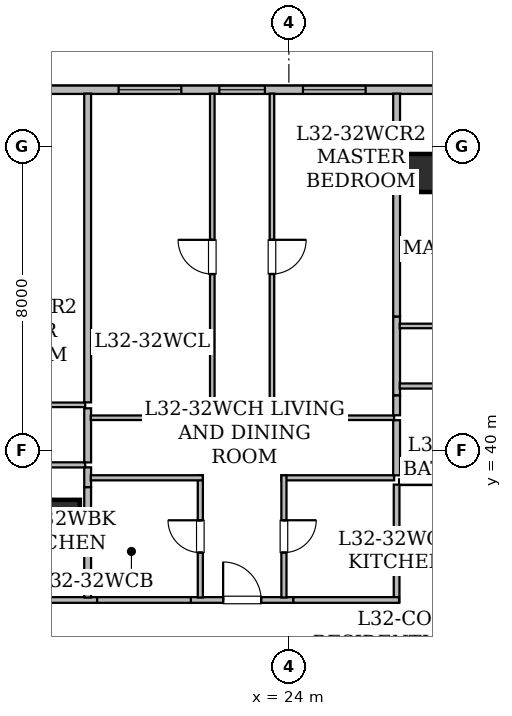
"""IFC4 building model, lengths in metres.
Left out: names, types, materials, properties, quantities, classifications, styles, units other than length and angle.
Written with IfcOpenShell. Run it as: python <this file> out.ifc"""

import sys

from ifc_helpers import new_model, si_unit, direction, frame, frame_2d, origin, origin_2d, place, context, subcontext, project, spatial, rectangle, hollow_rectangle, extrude, element, fill, save


model = new_model("IFC4")
c1 = context("Model", 3, precision=1e-05, world=origin(), true_north=direction((0.0, 1.0)))
c2 = subcontext(c1, "Body", "Model", "MODEL_VIEW")
j1 = project(units=[si_unit("LENGTHUNIT", "METRE"), si_unit("PLANEANGLEUNIT", "RADIAN")], contexts=[c1])
p1 = place(None, origin())
s1 = spatial("IfcSite", under=j1, at=p1, CompositionType="ELEMENT")
p2 = place(p1, origin())
s2 = spatial("IfcBuilding", under=s1, at=p2, CompositionType="ELEMENT")
p3 = place(p2, frame((0.0, 0.0, 127.45)))
s3 = spatial("IfcBuildingStorey", under=s2, at=p3, CompositionType="ELEMENT", Elevation=127.45)
for number, where, z_axis, x_axis in (
    (1, (27.35, 47.3, 0.0), (0.0, 0.0, 1.0), (1.0, 0.0, 0.0)),
    (2, (18.0, 38.2, 0.0), (0.0, 0.0, 1.0), (1.0, 0.0, 0.0)),
):
    element("IfcColumn", number, at=place(p3, frame(where, z_axis=z_axis, x_axis=x_axis)), inside=s3, PredefinedType="COLUMN", context=c2, shape_type="SweptSolid", body=[
        extrude(hollow_rectangle(XDim=1.0, YDim=1.0, WallThickness=0.05, at=origin_2d()), origin(), (0.0, 0.0, 1.0), 3.65),
    ])
p4 = place(p3, frame((13.715, 49.49, 0.0), z_axis=(0.0, 0.0, 1.0), x_axis=(1.0, 0.0, 0.0)))
e3 = element("IfcWall", 3, at=p4, inside=s3, PredefinedType="STANDARD", context=c2, shape_type="SweptSolid", body=[
    extrude(rectangle(XDim=38.639, YDim=0.22, at=frame_2d((19.319, 0.0))), origin(), (0.0, 0.0, 1.0), 3.43),
])
p5 = place(p4, frame((2.243, 0.0, 0.85)))
e4 = element("IfcOpeningElement", 4, at=p5, cuts=e3, PredefinedType="OPENING", context=c2, shape_type="SweptSolid", body=[
    extrude(rectangle(XDim=1.65, YDim=1.55, at=frame_2d((0.825, 0.775))), frame((0.0, 0.12, 0.0), z_axis=(0.0, -1.0, 0.0), x_axis=(1.0, 0.0, 0.0)), (0.0, 0.0, 1.0), 0.24),
])
p6 = place(p4, frame((8.455, 0.0, 0.8)))
e5 = element("IfcOpeningElement", 5, at=p6, cuts=e3, PredefinedType="OPENING", context=c2, shape_type="SweptSolid", body=[
    extrude(rectangle(XDim=1.2, YDim=1.5, at=frame_2d((0.6, 0.75))), frame((0.0, 0.12, 0.0), z_axis=(0.0, -1.0, 0.0), x_axis=(1.0, 0.0, 0.0)), (0.0, 0.0, 1.0), 0.24),
])
p7 = place(p4, frame((5.805, 0.0, 0.85)))
e6 = element("IfcOpeningElement", 6, at=p7, cuts=e3, PredefinedType="OPENING", context=c2, shape_type="SweptSolid", body=[
    extrude(rectangle(XDim=1.65, YDim=1.55, at=frame_2d((0.825, 0.775))), frame((0.0, 0.12, 0.0), z_axis=(0.0, -1.0, 0.0), x_axis=(1.0, 0.0, 0.0)), (0.0, 0.0, 1.0), 0.24),
])
p8 = place(p4, frame((10.655, 0.0, 0.85)))
e7 = element("IfcOpeningElement", 7, at=p8, cuts=e3, PredefinedType="OPENING", context=c2, shape_type="SweptSolid", body=[
    extrude(rectangle(XDim=1.65, YDim=1.55, at=frame_2d((0.825, 0.775))), frame((0.0, 0.12, 0.0), z_axis=(0.0, -1.0, 0.0), x_axis=(1.0, 0.0, 0.0)), (0.0, 0.0, 1.0), 0.24),
])
p9 = place(p4, frame((15.556, 0.0, 0.85)))
e8 = element("IfcOpeningElement", 8, at=p9, cuts=e3, PredefinedType="OPENING", context=c2, shape_type="SweptSolid", body=[
    extrude(rectangle(XDim=1.65, YDim=1.55, at=frame_2d((0.825, 0.775))), frame((0.0, 0.12, 0.0), z_axis=(0.0, -1.0, 0.0), x_axis=(1.0, 0.0, 0.0)), (0.0, 0.0, 1.0), 0.24),
])
p10 = place(p4, frame((22.821, 0.0, 0.85)))
e9 = element("IfcOpeningElement", 9, at=p10, cuts=e3, PredefinedType="OPENING", context=c2, shape_type="SweptSolid", body=[
    extrude(rectangle(XDim=1.65, YDim=1.55, at=frame_2d((0.825, 0.775))), frame((0.0, 0.12, 0.0), z_axis=(0.0, -1.0, 0.0), x_axis=(1.0, 0.0, 0.0)), (0.0, 0.0, 1.0), 0.24),
])
p11 = place(p4, frame((32.239, 0.0, 0.85)))
e10 = element("IfcOpeningElement", 10, at=p11, cuts=e3, PredefinedType="OPENING", context=c2, shape_type="SweptSolid", body=[
    extrude(rectangle(XDim=1.65, YDim=1.55, at=frame_2d((0.825, 0.775))), frame((0.0, 0.12, 0.0), z_axis=(0.0, -1.0, 0.0), x_axis=(1.0, 0.0, 0.0)), (0.0, 0.0, 1.0), 0.24),
])
p12 = place(p4, frame((28.676, 0.0, 0.85)))
e11 = element("IfcOpeningElement", 11, at=p12, cuts=e3, PredefinedType="OPENING", context=c2, shape_type="SweptSolid", body=[
    extrude(rectangle(XDim=1.65, YDim=1.55, at=frame_2d((0.825, 0.775))), frame((0.0, 0.12, 0.0), z_axis=(0.0, -1.0, 0.0), x_axis=(1.0, 0.0, 0.0)), (0.0, 0.0, 1.0), 0.24),
])
p13 = place(p4, frame((35.489, 0.0, 0.85)))
e12 = element("IfcOpeningElement", 12, at=p13, cuts=e3, PredefinedType="OPENING", context=c2, shape_type="SweptSolid", body=[
    extrude(rectangle(XDim=1.65, YDim=1.55, at=frame_2d((0.825, 0.775))), frame((0.0, 0.12, 0.0), z_axis=(0.0, -1.0, 0.0), x_axis=(1.0, 0.0, 0.0)), (0.0, 0.0, 1.0), 0.24),
])
p14 = place(p3, frame((15.424, 36.065, 0.0), z_axis=(0.0, 0.0, 1.0), x_axis=(1.0, 0.0, 0.0)))
e13 = element("IfcWall", 13, at=p14, inside=s3, PredefinedType="STANDARD", context=c2, shape_type="SweptSolid", body=[
    extrude(rectangle(XDim=3.53, YDim=0.15, at=frame_2d((1.765, 0.0))), origin(), (0.0, 0.0, 1.0), 2.647),
])
p15 = place(p3, frame((21.421, 36.065, 0.0), z_axis=(0.0, 0.0, 1.0), x_axis=(1.0, 0.0, 0.0)))
e14 = element("IfcWall", 14, at=p15, inside=s3, PredefinedType="STANDARD", context=c2, shape_type="SweptSolid", body=[
    extrude(rectangle(XDim=2.698, YDim=0.15, at=frame_2d((1.349, 0.0))), origin(), (0.0, 0.0, 1.0), 3.43),
])
p16 = place(p15, frame((0.849, 0.0, 0.0)))
e15 = element("IfcOpeningElement", 15, at=p16, cuts=e14, PredefinedType="OPENING", context=c2, shape_type="SweptSolid", body=[
    extrude(rectangle(XDim=1.0, YDim=2.15, at=frame_2d((0.5, 1.075))), frame((0.0, 0.085, 0.0), z_axis=(0.0, -1.0, 0.0), x_axis=(1.0, 0.0, 0.0)), (0.0, 0.0, 1.0), 0.17),
])
p17 = place(p3, frame((18.954, 36.065, 0.0), z_axis=(0.0, 0.0, 1.0), x_axis=(1.0, 0.0, 0.0)))
e16 = element("IfcWall", 16, at=p17, inside=s3, PredefinedType="STANDARD", context=c2, shape_type="SweptSolid", body=[
    extrude(rectangle(XDim=2.467, YDim=0.15, at=frame_2d((1.233, 0.0))), origin(), (0.0, 0.0, 1.0), 3.43),
])
p18 = place(p3, frame((26.835, 36.0, 0.0), z_axis=(0.0, 0.0, 1.0), x_axis=(0.0, 1.0, 0.0)))
e17 = element("IfcWall", 17, at=p18, inside=s3, PredefinedType="STANDARD", context=c2, shape_type="SweptSolid", body=[
    extrude(rectangle(XDim=3.1, YDim=0.15, at=frame_2d((1.55, 0.0))), origin(), (0.0, 0.0, 1.0), 2.647),
])
p19 = place(p3, frame((24.119, 36.065, 0.0), z_axis=(0.0, 0.0, 1.0), x_axis=(1.0, 0.0, 0.0)))
e18 = element("IfcWall", 18, at=p19, inside=s3, PredefinedType="STANDARD", context=c2, shape_type="SweptSolid", body=[
    extrude(rectangle(XDim=2.779, YDim=0.15, at=frame_2d((1.39, 0.0))), origin(), (0.0, 0.0, 1.0), 3.43),
])
p20 = place(p3, frame((26.9, 39.165, 0.0), z_axis=(0.0, 0.0, 1.0), x_axis=(1.0, 0.0, 0.0)))
e19 = element("IfcWall", 19, at=p20, inside=s3, PredefinedType="STANDARD", context=c2, shape_type="SweptSolid", body=[
    extrude(rectangle(XDim=4.701, YDim=0.15, at=frame_2d((2.351, 0.0))), origin(), (0.0, 0.0, 1.0), 2.647),
])
p21 = place(p3, frame((18.64, 39.62, 0.0), z_axis=(0.0, 0.0, 1.0), x_axis=(-1.0, 0.0, 0.0)))
e20 = element("IfcWall", 20, at=p21, inside=s3, PredefinedType="PARTITIONING", context=c2, shape_type="SweptSolid", body=[
    extrude(rectangle(XDim=3.53, YDim=0.135, at=frame_2d((1.765, 0.0))), origin(), (0.0, 0.0, 1.0), 2.647),
])
p22 = place(p3, frame((14.795, 41.2, 0.0), z_axis=(0.0, 0.0, 1.0), x_axis=(1.0, 0.0, 0.0)))
e21 = element("IfcWall", 21, at=p22, inside=s3, PredefinedType="PARTITIONING", context=c2, shape_type="SweptSolid", body=[
    extrude(rectangle(XDim=3.845, YDim=0.12, at=frame_2d((1.922, 0.0))), origin(), (0.0, 0.0, 1.0), 2.647),
])
p23 = place(p3, frame((18.705, 41.109, 0.0), z_axis=(0.0, 0.0, 1.0), x_axis=(0.0, -1.0, 0.0)))
e22 = element("IfcWall", 22, at=p23, inside=s3, PredefinedType="STANDARD", context=c2, shape_type="SweptSolid", body=[
    extrude(rectangle(XDim=1.424, YDim=0.18, at=frame_2d((0.712, 0.0))), origin(), (0.0, 0.0, 1.0), 3.43),
])
p24 = place(p3, frame((18.705, 39.555, 0.0), z_axis=(0.0, 0.0, 1.0), x_axis=(0.0, -1.0, 0.0)))
e23 = element("IfcWall", 23, at=p24, inside=s3, PredefinedType="STANDARD", context=c2, shape_type="SweptSolid", body=[
    extrude(rectangle(XDim=0.524, YDim=0.18, at=frame_2d((0.262, 0.0))), origin(), (0.0, 0.0, 1.0), 3.43),
])
p25 = place(p3, frame((18.705, 39.031, 0.0), z_axis=(0.0, 0.0, 1.0), x_axis=(0.0, -1.0, 0.0)))
e24 = element("IfcWall", 24, at=p25, inside=s3, PredefinedType="STANDARD", context=c2, shape_type="SweptSolid", body=[
    extrude(rectangle(XDim=2.901, YDim=0.18, at=frame_2d((1.451, 0.0))), origin(), (0.0, 0.0, 1.0), 2.647),
])
p26 = place(p3, frame((18.705, 49.388, 0.0), z_axis=(0.0, 0.0, 1.0), x_axis=(0.0, -1.0, 0.0)))
e25 = element("IfcWall", 25, at=p26, inside=s3, PredefinedType="STANDARD", context=c2, shape_type="SweptSolid", body=[
    extrude(rectangle(XDim=8.123, YDim=0.18, at=frame_2d((4.062, 0.0))), origin(), (0.0, 0.0, 1.0), 2.876),
])
p27 = place(p3, frame((21.67, 36.13, 0.0), z_axis=(0.0, 0.0, 1.0), x_axis=(0.0, 1.0, 0.0)))
e26 = element("IfcWall", 26, at=p27, inside=s3, PredefinedType="PARTITIONING", context=c2, shape_type="SweptSolid", body=[
    extrude(rectangle(XDim=3.215, YDim=0.135, at=frame_2d((1.607, 0.0))), origin(), (0.0, 0.0, 1.0), 2.647),
])
p28 = place(p27, frame((1.182, 0.0, 0.0)))
e27 = element("IfcOpeningElement", 27, at=p28, cuts=e26, PredefinedType="OPENING", context=c2, shape_type="SweptSolid", body=[
    extrude(rectangle(XDim=0.85, YDim=2.1, at=frame_2d((0.425, 1.05))), frame((0.0, 0.077, 0.0), z_axis=(0.0, -1.0, 0.0), x_axis=(1.0, 0.0, 0.0)), (0.0, 0.0, 1.0), 0.155),
])
p29 = place(p3, frame((21.735, 39.28, 0.0), z_axis=(0.0, 0.0, 1.0), x_axis=(-1.0, 0.0, 0.0)))
e28 = element("IfcWall", 28, at=p29, inside=s3, PredefinedType="PARTITIONING", context=c2, shape_type="SweptSolid", body=[
    extrude(rectangle(XDim=2.948, YDim=0.135, at=frame_2d((1.474, 0.0))), origin(), (0.0, 0.0, 1.0), 3.43),
])
p30 = place(p3, frame((26.77, 39.28, 0.0), z_axis=(0.0, 0.0, 1.0), x_axis=(-1.0, 0.0, 0.0)))
e29 = element("IfcWall", 29, at=p30, inside=s3, PredefinedType="PARTITIONING", context=c2, shape_type="SweptSolid", body=[
    extrude(rectangle(XDim=2.965, YDim=0.135, at=frame_2d((1.482, 0.0))), origin(), (0.0, 0.0, 1.0), 3.43),
])
p31 = place(p3, frame((23.87, 39.345, 0.0), z_axis=(0.0, 0.0, 1.0), x_axis=(0.0, -1.0, 0.0)))
e30 = element("IfcWall", 30, at=p31, inside=s3, PredefinedType="PARTITIONING", context=c2, shape_type="SweptSolid", body=[
    extrude(rectangle(XDim=3.215, YDim=0.135, at=frame_2d((1.607, 0.0))), origin(), (0.0, 0.0, 1.0), 2.647),
])
p32 = place(p31, frame((1.182, 0.0, 0.0)))
e31 = element("IfcOpeningElement", 31, at=p32, cuts=e30, PredefinedType="OPENING", context=c2, shape_type="SweptSolid", body=[
    extrude(rectangle(XDim=0.85, YDim=2.1, at=frame_2d((0.425, 1.05))), frame((0.0, 0.077, 0.0), z_axis=(0.0, -1.0, 0.0), x_axis=(1.0, 0.0, 0.0)), (0.0, 0.0, 1.0), 0.155),
])
p33 = place(p3, frame((18.787, 40.86, 0.0), z_axis=(0.0, 0.0, 1.0), x_axis=(1.0, 0.0, 0.0)))
e32 = element("IfcWall", 32, at=p33, inside=s3, PredefinedType="PARTITIONING", context=c2, shape_type="SweptSolid", body=[
    extrude(rectangle(XDim=3.263, YDim=0.12, at=frame_2d((1.631, 0.0))), origin(), (0.0, 0.0, 1.0), 3.43),
])
p34 = place(p3, frame((21.985, 40.795, 0.0), z_axis=(0.0, 0.0, 1.0), x_axis=(0.0, 1.0, 0.0)))
e33 = element("IfcWall", 33, at=p34, inside=s3, PredefinedType="PARTITIONING", context=c2, shape_type="SweptSolid", body=[
    extrude(rectangle(XDim=8.593, YDim=0.12, at=frame_2d((4.296, 0.0))), origin(), (0.0, 0.0, 1.0), 2.876),
])
p35 = place(p34, frame((3.846, 0.0, 0.0)))
e34 = element("IfcOpeningElement", 34, at=p35, cuts=e33, PredefinedType="OPENING", context=c2, shape_type="SweptSolid", body=[
    extrude(rectangle(XDim=0.9, YDim=2.1, at=frame_2d((0.45, 1.05))), frame((0.0, 0.07, 0.0), z_axis=(0.0, -1.0, 0.0), x_axis=(1.0, 0.0, 0.0)), (0.0, 0.0, 1.0), 0.14),
])
p36 = place(p3, frame((23.555, 49.388, 0.0), z_axis=(0.0, 0.0, 1.0), x_axis=(0.0, -1.0, 0.0)))
e35 = element("IfcWall", 35, at=p36, inside=s3, PredefinedType="PARTITIONING", context=c2, shape_type="SweptSolid", body=[
    extrude(rectangle(XDim=8.593, YDim=0.12, at=frame_2d((4.296, 0.0))), origin(), (0.0, 0.0, 1.0), 2.876),
])
p37 = place(p36, frame((3.846, 0.0, 0.0)))
e36 = element("IfcOpeningElement", 36, at=p37, cuts=e35, PredefinedType="OPENING", context=c2, shape_type="SweptSolid", body=[
    extrude(rectangle(XDim=0.9, YDim=2.1, at=frame_2d((0.45, 1.05))), frame((0.0, 0.07, 0.0), z_axis=(0.0, -1.0, 0.0), x_axis=(1.0, 0.0, 0.0)), (0.0, 0.0, 1.0), 0.14),
])
p38 = place(p3, frame((23.49, 40.86, 0.0), z_axis=(0.0, 0.0, 1.0), x_axis=(1.0, 0.0, 0.0)))
e37 = element("IfcWall", 37, at=p38, inside=s3, PredefinedType="PARTITIONING", context=c2, shape_type="SweptSolid", body=[
    extrude(rectangle(XDim=3.28, YDim=0.12, at=frame_2d((1.64, 0.0))), origin(), (0.0, 0.0, 1.0), 3.43),
])
p39 = place(p3, frame((26.835, 40.795, 0.0), z_axis=(0.0, 0.0, 1.0), x_axis=(0.0, -1.0, 0.0)))
e38 = element("IfcWall", 38, at=p39, inside=s3, PredefinedType="STANDARD", context=c2, shape_type="SweptSolid", body=[
    extrude(rectangle(XDim=1.45, YDim=0.18, at=frame_2d((0.725, 0.0))), origin(), (0.0, 0.0, 1.0), 3.43),
])
p40 = place(p3, frame((26.835, 43.524, 0.0), z_axis=(0.0, 0.0, 1.0), x_axis=(0.0, -1.0, 0.0)))
e39 = element("IfcWall", 39, at=p40, inside=s3, PredefinedType="STANDARD", context=c2, shape_type="SweptSolid", body=[
    extrude(rectangle(XDim=2.078, YDim=0.18, at=frame_2d((1.039, 0.0))), origin(), (0.0, 0.0, 1.0), 3.43),
])
p41 = place(p3, frame((26.835, 41.446, 0.0), z_axis=(0.0, 0.0, 1.0), x_axis=(0.0, -1.0, 0.0)))
e40 = element("IfcWall", 40, at=p41, inside=s3, PredefinedType="STANDARD", context=c2, shape_type="SweptSolid", body=[
    extrude(rectangle(XDim=0.521, YDim=0.18, at=frame_2d((0.26, 0.0))), origin(), (0.0, 0.0, 1.0), 3.43),
])
p42 = place(p3, frame((26.835, 49.388, 0.0), z_axis=(0.0, 0.0, 1.0), x_axis=(0.0, -1.0, 0.0)))
e41 = element("IfcWall", 41, at=p42, inside=s3, PredefinedType="STANDARD", context=c2, shape_type="SweptSolid", body=[
    extrude(rectangle(XDim=5.864, YDim=0.18, at=frame_2d((2.932, 0.0))), origin(), (0.0, 0.0, 1.0), 2.876),
])
p43 = place(p3, frame((31.915, 41.695, 0.0), z_axis=(0.0, 0.0, 1.0), x_axis=(-1.0, 0.0, 0.0)))
e42 = element("IfcWall", 42, at=p43, inside=s3, PredefinedType="PARTITIONING", context=c2, shape_type="SweptSolid", body=[
    extrude(rectangle(XDim=4.998, YDim=0.135, at=frame_2d((2.499, 0.0))), origin(), (0.0, 0.0, 1.0), 2.647),
])
p44 = place(p43, frame((2.074, 0.0, 0.0)))
e43 = element("IfcOpeningElement", 43, at=p44, cuts=e42, PredefinedType="OPENING", context=c2, shape_type="SweptSolid", body=[
    extrude(rectangle(XDim=0.85, YDim=2.1, at=frame_2d((0.425, 1.05))), frame((0.0, 0.077, 0.0), z_axis=(0.0, -1.0, 0.0), x_axis=(1.0, 0.0, 0.0)), (0.0, 0.0, 1.0), 0.155),
])
p45 = place(p3, frame((26.917, 43.275, 0.0), z_axis=(0.0, 0.0, 1.0), x_axis=(1.0, 0.0, 0.0)))
e44 = element("IfcWall", 44, at=p45, inside=s3, PredefinedType="PARTITIONING", context=c2, shape_type="SweptSolid", body=[
    extrude(rectangle(XDim=6.69, YDim=0.12, at=frame_2d((3.345, 0.0))), origin(), (0.0, 0.0, 1.0), 2.647),
])
p46 = place(p45, frame((2.873, 0.0, 0.0)))
e45 = element("IfcOpeningElement", 45, at=p46, cuts=e44, PredefinedType="OPENING", context=c2, shape_type="SweptSolid", body=[
    extrude(rectangle(XDim=0.9, YDim=2.1, at=frame_2d((0.45, 1.05))), frame((0.0, 0.07, 0.0), z_axis=(0.0, -1.0, 0.0), x_axis=(1.0, 0.0, 0.0)), (0.0, 0.0, 1.0), 0.14),
])
p47 = place(p6, origin())
e46 = element("IfcWindow", 46, at=p47, inside=s3, PartitioningType="SINGLE_PANEL", PredefinedType="WINDOW", context=c2, shape_type="SweptSolid", body=[
    extrude(rectangle(XDim=1.2, YDim=1.5, at=frame_2d((0.6, 0.75))), frame((0.0, 0.03, 0.0), z_axis=(0.0, -1.0, 0.0), x_axis=(1.0, 0.0, 0.0)), (0.0, 0.0, 1.0), 0.06),
])
fill(e5, e46)
p48 = place(p7, origin())
e47 = element("IfcWindow", 47, at=p48, inside=s3, PartitioningType="SINGLE_PANEL", PredefinedType="WINDOW", context=c2, shape_type="SweptSolid", body=[
    extrude(rectangle(XDim=1.65, YDim=1.55, at=frame_2d((0.825, 0.775))), frame((0.0, 0.03, 0.0), z_axis=(0.0, -1.0, 0.0), x_axis=(1.0, 0.0, 0.0)), (0.0, 0.0, 1.0), 0.06),
])
fill(e6, e47)
p49 = place(p8, origin())
e48 = element("IfcWindow", 48, at=p49, inside=s3, PartitioningType="SINGLE_PANEL", PredefinedType="WINDOW", context=c2, shape_type="SweptSolid", body=[
    extrude(rectangle(XDim=1.65, YDim=1.55, at=frame_2d((0.825, 0.775))), frame((0.0, 0.03, 0.0), z_axis=(0.0, -1.0, 0.0), x_axis=(1.0, 0.0, 0.0)), (0.0, 0.0, 1.0), 0.06),
])
fill(e7, e48)
p50 = place(p16, origin())
e49 = element("IfcDoor", 49, at=p50, inside=s3, OperationType="SINGLE_SWING_LEFT", PredefinedType="DOOR", context=c2, shape_type="SweptSolid", body=[
    extrude(rectangle(XDim=1.0, YDim=2.15, at=frame_2d((0.5, 1.075))), frame((0.0, 0.025, 0.0), z_axis=(0.0, -1.0, 0.0), x_axis=(1.0, 0.0, 0.0)), (0.0, 0.0, 1.0), 0.05),
])
fill(e15, e49)
p51 = place(p28, origin())
e50 = element("IfcDoor", 50, at=p51, inside=s3, OperationType="SINGLE_SWING_RIGHT", PredefinedType="DOOR", context=c2, shape_type="SweptSolid", body=[
    extrude(rectangle(XDim=0.85, YDim=2.1, at=frame_2d((0.425, 1.05))), frame((0.0, 0.025, 0.0), z_axis=(0.0, -1.0, 0.0), x_axis=(1.0, 0.0, 0.0)), (0.0, 0.0, 1.0), 0.05),
])
fill(e27, e50)
p52 = place(p32, origin())
e51 = element("IfcDoor", 51, at=p52, inside=s3, OperationType="SINGLE_SWING_LEFT", PredefinedType="DOOR", context=c2, shape_type="SweptSolid", body=[
    extrude(rectangle(XDim=0.85, YDim=2.1, at=frame_2d((0.425, 1.05))), frame((0.0, 0.025, 0.0), z_axis=(0.0, -1.0, 0.0), x_axis=(1.0, 0.0, 0.0)), (0.0, 0.0, 1.0), 0.05),
])
fill(e31, e51)
p53 = place(p35, origin())
e52 = element("IfcDoor", 52, at=p53, inside=s3, OperationType="SINGLE_SWING_RIGHT", PredefinedType="DOOR", context=c2, shape_type="SweptSolid", body=[
    extrude(rectangle(XDim=0.9, YDim=2.1, at=frame_2d((0.45, 1.05))), frame((0.0, 0.025, 0.0), z_axis=(0.0, -1.0, 0.0), x_axis=(1.0, 0.0, 0.0)), (0.0, 0.0, 1.0), 0.05),
])
fill(e34, e52)
p54 = place(p37, origin())
e53 = element("IfcDoor", 53, at=p54, inside=s3, OperationType="SINGLE_SWING_LEFT", PredefinedType="DOOR", context=c2, shape_type="SweptSolid", body=[
    extrude(rectangle(XDim=0.9, YDim=2.1, at=frame_2d((0.45, 1.05))), frame((0.0, 0.025, 0.0), z_axis=(0.0, -1.0, 0.0), x_axis=(1.0, 0.0, 0.0)), (0.0, 0.0, 1.0), 0.05),
])
fill(e36, e53)
save(model, sys.argv[1])
